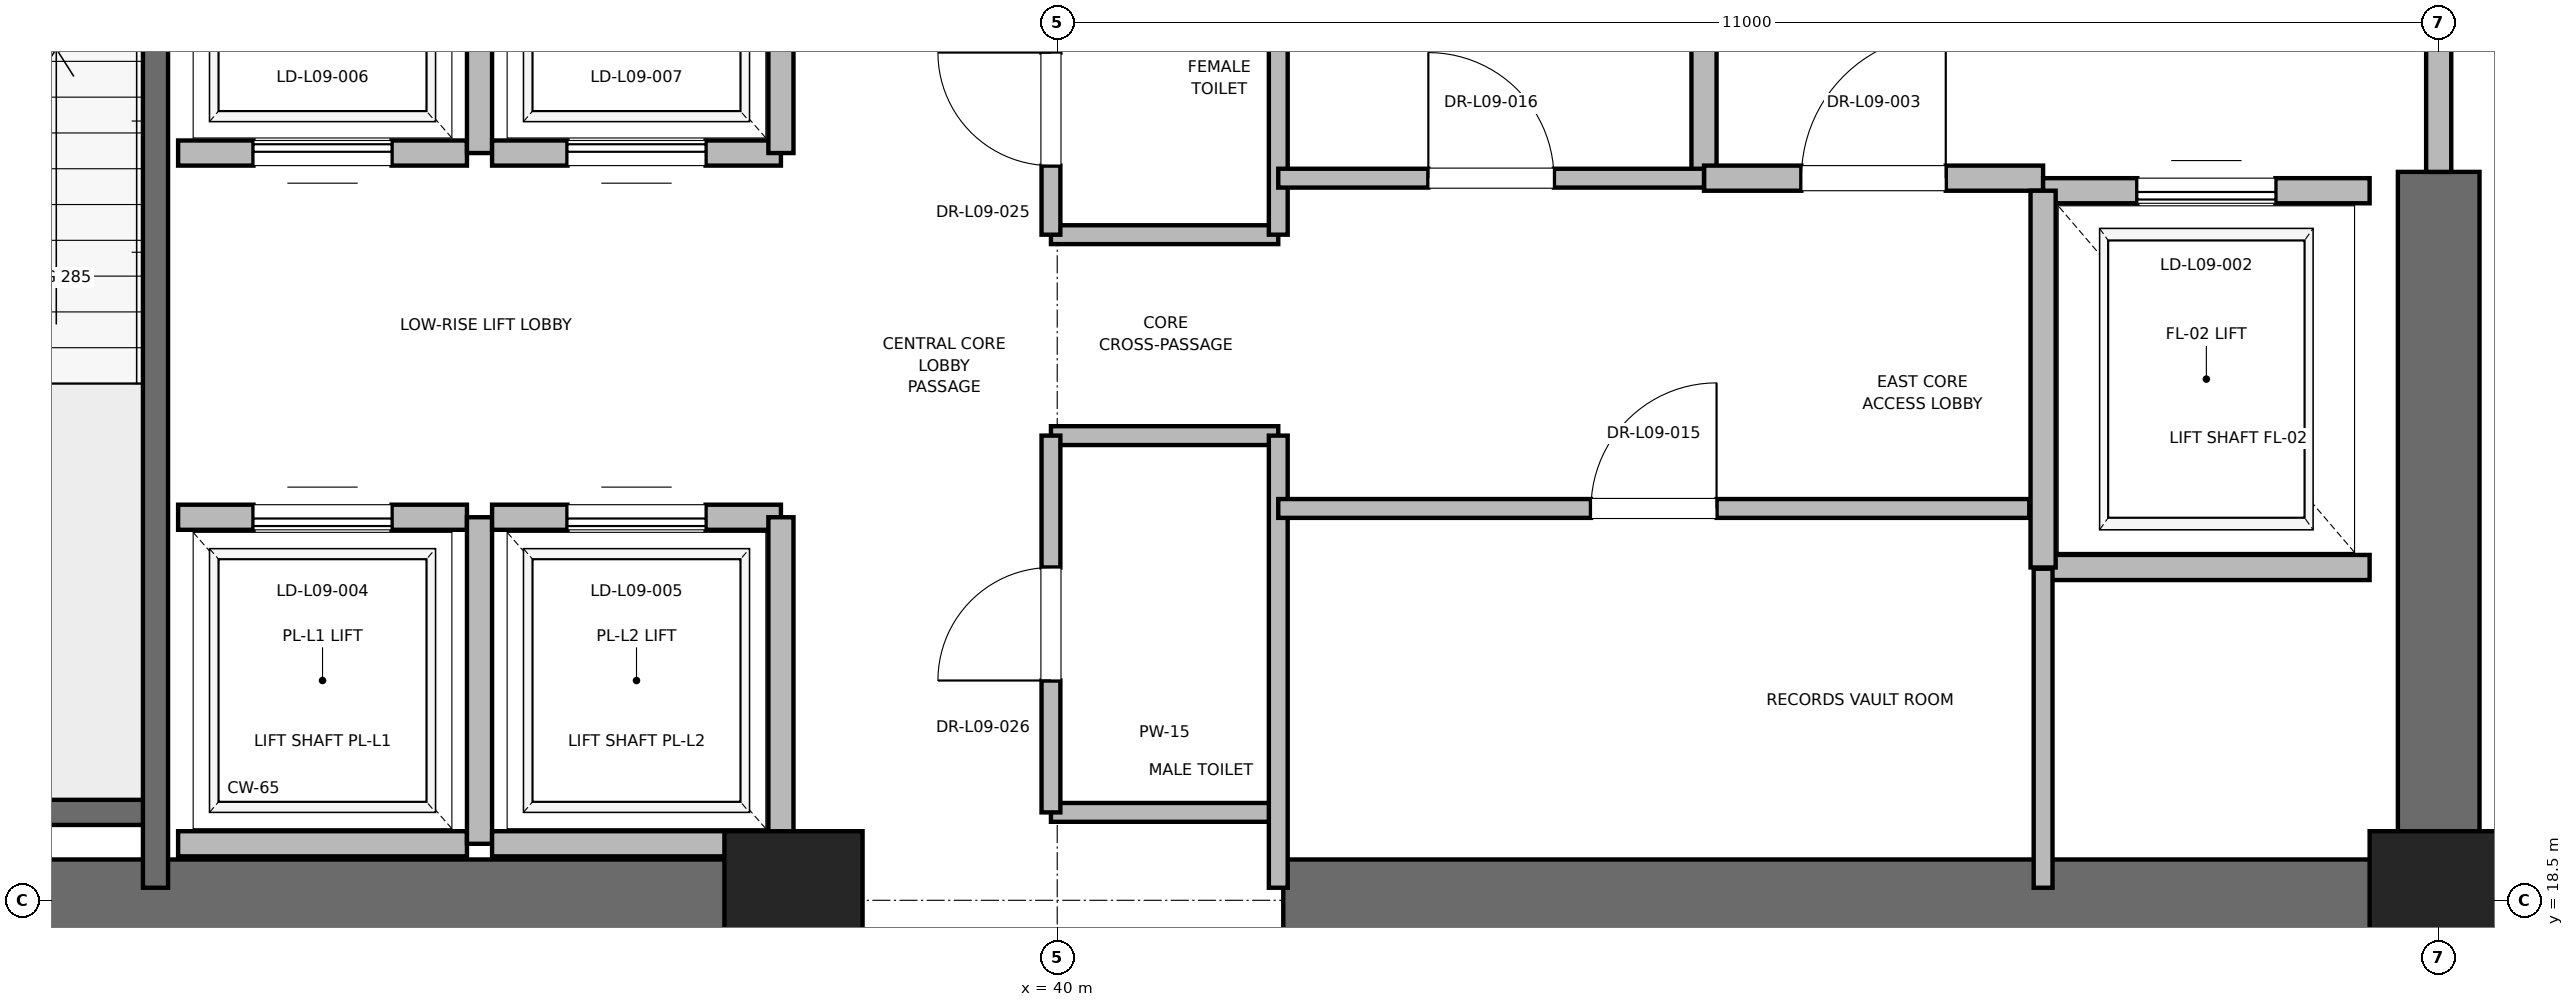
"""IFC4 building model, lengths in metres.
Left out: names, types, materials, properties, quantities, classifications, styles, units other than length and angle.
Written with IfcOpenShell. Run it as: python <this file> out.ifc"""

import sys

from ifc_helpers import new_model, si_unit, direction, frame, frame_2d, origin, origin_2d, place, context, subcontext, project, spatial, rectangle, extrude, element, fill, save


model = new_model("IFC4")
c1 = context("Model", 3, precision=1e-05, world=origin(), true_north=direction((0.0, 1.0)))
c2 = subcontext(c1, "Body", "Model", "MODEL_VIEW")
j1 = project(units=[si_unit("LENGTHUNIT", "METRE"), si_unit("PLANEANGLEUNIT", "RADIAN")], contexts=[c1])
p1 = place(None, origin())
s1 = spatial("IfcSite", under=j1, at=p1, CompositionType="ELEMENT")
p2 = place(p1, origin())
s2 = spatial("IfcBuilding", under=s1, at=p2, CompositionType="ELEMENT")
p3 = place(p2, frame((0.0, 0.0, 43.6)))
s3 = spatial("IfcBuildingStorey", under=s2, at=p3, CompositionType="ELEMENT", Elevation=43.6)
for number, where, z_axis, x_axis in (
    (1, (51.0, 18.5, 0.0), (0.0, 0.0, 1.0), (1.0, 0.0, 0.0)),
    (2, (37.9, 18.5, 0.0), (0.0, 0.0, 1.0), (1.0, 0.0, 0.0)),
):
    element("IfcColumn", number, at=place(p3, frame(where, z_axis=z_axis, x_axis=x_axis)), inside=s3, PredefinedType="PILASTER", context=c2, shape_type="SweptSolid", body=[
        extrude(rectangle(XDim=1.1, YDim=1.1, at=origin_2d()), origin(), (0.0, 0.0, 1.0), 4.0),
    ])
for number, where, z_axis, x_axis in (
    (3, (29.0, 18.5, 0.0), (0.0, 0.0, 1.0), (1.0, 0.0, 0.0)),
    (4, (41.8, 18.5, 0.0), (0.0, 0.0, 1.0), (1.0, 0.0, 0.0)),
):
    element("IfcWall", number, at=place(p3, frame(where, z_axis=z_axis, x_axis=x_axis)), inside=s3, PredefinedType="SHEAR", context=c2, shape_type="SweptSolid", body=[
        extrude(rectangle(XDim=9.2, YDim=0.65, at=frame_2d((4.6, 0.0))), origin(), (0.0, 0.0, 1.0), 3.76),
    ])
p4 = place(p3, frame((51.0, 18.5, 0.0), z_axis=(0.0, 0.0, 1.0), x_axis=(0.0, 1.0, 0.0)))
e5 = element("IfcWall", 5, at=p4, inside=s3, PredefinedType="SHEAR", context=c2, shape_type="SweptSolid", body=[
    extrude(rectangle(XDim=5.8, YDim=0.65, at=frame_2d((2.9, 0.0))), origin(), (0.0, 0.0, 1.0), 3.76),
])
p5 = place(p3, frame((29.7, 19.2, 0.0), z_axis=(0.0, 0.0, 1.0), x_axis=(1.0, 0.0, 0.0)))
e6 = element("IfcWall", 6, at=p5, inside=s3, PredefinedType="SOLIDWALL", context=c2, shape_type="SweptSolid", body=[
    extrude(rectangle(XDim=3.12, YDim=0.2, at=frame_2d((1.56, 0.0))), origin(), (0.0, 0.0, 1.0), 3.76),
])
p6 = place(p3, frame((32.82, 18.6, 0.0), z_axis=(0.0, 0.0, 1.0), x_axis=(0.0, 1.0, 0.0)))
e7 = element("IfcWall", 7, at=p6, inside=s3, PredefinedType="SOLIDWALL", context=c2, shape_type="SweptSolid", body=[
    extrude(rectangle(XDim=8.78, YDim=0.2, at=frame_2d((4.39, 0.0))), origin(), (0.0, 0.0, 1.0), 3.76),
])
p7 = place(p3, frame((45.15, 24.25, 0.0), z_axis=(0.0, 0.0, 1.0), x_axis=(0.0, 1.0, 0.0)))
e8 = element("IfcWall", 8, at=p7, inside=s3, PredefinedType="PARTITIONING", context=c2, shape_type="SweptSolid", body=[
    extrude(rectangle(XDim=3.37, YDim=0.2, at=frame_2d((1.685, 0.0))), origin(), (0.0, 0.0, 1.0), 3.76),
])
p8 = place(p3, frame((45.15, 24.25, 0.0), z_axis=(0.0, 0.0, 1.0), x_axis=(1.0, 0.0, 0.0)))
e9 = element("IfcWall", 9, at=p8, inside=s3, PredefinedType="PARTITIONING", context=c2, shape_type="SweptSolid", body=[
    extrude(rectangle(XDim=2.7, YDim=0.2, at=frame_2d((1.35, 0.0))), origin(), (0.0, 0.0, 1.0), 3.76),
])
p9 = place(p8, frame((0.775, 0.0, 0.0)))
e10 = element("IfcOpeningElement", 10, at=p9, cuts=e9, PredefinedType="OPENING", context=c2, shape_type="SweptSolid", body=[
    extrude(rectangle(XDim=1.15, YDim=2.2, at=frame_2d((0.575, 1.1))), frame((0.0, 0.1, 0.0), z_axis=(0.0, -1.0, 0.0), x_axis=(1.0, 0.0, 0.0)), (0.0, 0.0, 1.0), 0.2),
])
p10 = place(p3, frame((51.0, 24.3, 0.0), z_axis=(0.0, 0.0, 1.0), x_axis=(0.0, 1.0, 0.0)))
e11 = element("IfcWall", 11, at=p10, inside=s3, PredefinedType="PARTITIONING", context=c2, shape_type="SweptSolid", body=[
    extrude(rectangle(XDim=3.4, YDim=0.2, at=frame_2d((1.7, 0.0))), origin(), (0.0, 0.0, 1.0), 2.54),
])
p11 = place(p10, frame((1.125, 0.0, 0.0)))
e12 = element("IfcOpeningElement", 12, at=p11, cuts=e11, PredefinedType="OPENING", context=c2, shape_type="SweptSolid", body=[
    extrude(rectangle(XDim=1.15, YDim=2.2, at=frame_2d((0.575, 1.1))), frame((0.0, 0.1, 0.0), z_axis=(0.0, -1.0, 0.0), x_axis=(1.0, 0.0, 0.0)), (0.0, 0.0, 1.0), 0.2),
])
p12 = place(p3, frame((47.85, 21.15, 0.0), z_axis=(0.0, 0.0, 1.0), x_axis=(1.0, 0.0, 0.0)))
e13 = element("IfcWall", 13, at=p12, inside=s3, PredefinedType="SOLIDWALL", context=c2, shape_type="SweptSolid", body=[
    extrude(rectangle(XDim=2.6, YDim=0.2, at=frame_2d((1.3, 0.0))), origin(), (0.0, 0.0, 1.0), 3.76),
])
p13 = place(p3, frame((50.45, 24.15, 0.0), z_axis=(0.0, 0.0, 1.0), x_axis=(-1.0, 0.0, 0.0)))
e14 = element("IfcWall", 14, at=p13, inside=s3, PredefinedType="SOLIDWALL", context=c2, shape_type="SweptSolid", body=[
    extrude(rectangle(XDim=2.6, YDim=0.2, at=frame_2d((1.3, 0.0))), origin(), (0.0, 0.0, 1.0), 2.54),
])
p14 = place(p13, frame((0.75, 0.0, 0.0)))
e15 = element("IfcOpeningElement", 15, at=p14, cuts=e14, PredefinedType="OPENING", context=c2, shape_type="SweptSolid", body=[
    extrude(rectangle(XDim=1.1, YDim=2.2, at=frame_2d((0.55, 1.1))), frame((0.0, 0.1, 0.0), z_axis=(0.0, -1.0, 0.0), x_axis=(1.0, 0.0, 0.0)), (0.0, 0.0, 1.0), 0.2),
])
p15 = place(p3, frame((47.85, 24.15, 0.0), z_axis=(0.0, 0.0, 1.0), x_axis=(0.0, -1.0, 0.0)))
e16 = element("IfcWall", 16, at=p15, inside=s3, PredefinedType="SOLIDWALL", context=c2, shape_type="SweptSolid", body=[
    extrude(rectangle(XDim=3.0, YDim=0.2, at=frame_2d((1.5, 0.0))), origin(), (0.0, 0.0, 1.0), 3.76),
])
p16 = place(p3, frame((33.0, 18.95, 0.0), z_axis=(0.0, 0.0, 1.0), x_axis=(1.0, 0.0, 0.0)))
e17 = element("IfcWall", 17, at=p16, inside=s3, PredefinedType="SOLIDWALL", context=c2, shape_type="SweptSolid", body=[
    extrude(rectangle(XDim=2.3, YDim=0.2, at=frame_2d((1.15, 0.0))), origin(), (0.0, 0.0, 1.0), 3.76),
])
p17 = place(p3, frame((35.3, 21.55, 0.0), z_axis=(0.0, 0.0, 1.0), x_axis=(-1.0, 0.0, 0.0)))
e18 = element("IfcWall", 18, at=p17, inside=s3, PredefinedType="SOLIDWALL", context=c2, shape_type="SweptSolid", body=[
    extrude(rectangle(XDim=2.3, YDim=0.2, at=frame_2d((1.15, 0.0))), origin(), (0.0, 0.0, 1.0), 3.76),
])
p18 = place(p17, frame((0.6, 0.0, 0.0)))
e19 = element("IfcOpeningElement", 19, at=p18, cuts=e18, PredefinedType="OPENING", context=c2, shape_type="SweptSolid", body=[
    extrude(rectangle(XDim=1.1, YDim=2.2, at=frame_2d((0.55, 1.1))), frame((0.0, 0.1, 0.0), z_axis=(0.0, -1.0, 0.0), x_axis=(1.0, 0.0, 0.0)), (0.0, 0.0, 1.0), 0.2),
])
p19 = place(p3, frame((35.4, 18.95, 0.0), z_axis=(0.0, 0.0, 1.0), x_axis=(0.0, 1.0, 0.0)))
e20 = element("IfcWall", 20, at=p19, inside=s3, PredefinedType="SOLIDWALL", context=c2, shape_type="SweptSolid", body=[
    extrude(rectangle(XDim=2.6, YDim=0.2, at=frame_2d((1.3, 0.0))), origin(), (0.0, 0.0, 1.0), 3.76),
])
p20 = place(p3, frame((35.5, 18.95, 0.0), z_axis=(0.0, 0.0, 1.0), x_axis=(1.0, 0.0, 0.0)))
e21 = element("IfcWall", 21, at=p20, inside=s3, PredefinedType="SOLIDWALL", context=c2, shape_type="SweptSolid", body=[
    extrude(rectangle(XDim=2.3, YDim=0.2, at=frame_2d((1.15, 0.0))), origin(), (0.0, 0.0, 1.0), 2.54),
])
p21 = place(p3, frame((37.8, 21.55, 0.0), z_axis=(0.0, 0.0, 1.0), x_axis=(-1.0, 0.0, 0.0)))
e22 = element("IfcWall", 22, at=p21, inside=s3, PredefinedType="SOLIDWALL", context=c2, shape_type="SweptSolid", body=[
    extrude(rectangle(XDim=2.3, YDim=0.2, at=frame_2d((1.15, 0.0))), origin(), (0.0, 0.0, 1.0), 3.76),
])
p22 = place(p21, frame((0.6, 0.0, 0.0)))
e23 = element("IfcOpeningElement", 23, at=p22, cuts=e22, PredefinedType="OPENING", context=c2, shape_type="SweptSolid", body=[
    extrude(rectangle(XDim=1.1, YDim=2.2, at=frame_2d((0.55, 1.1))), frame((0.0, 0.1, 0.0), z_axis=(0.0, -1.0, 0.0), x_axis=(1.0, 0.0, 0.0)), (0.0, 0.0, 1.0), 0.2),
])
p23 = place(p3, frame((37.8, 18.95, 0.0), z_axis=(0.0, 0.0, 1.0), x_axis=(0.0, 1.0, 0.0)))
e24 = element("IfcWall", 24, at=p23, inside=s3, PredefinedType="SOLIDWALL", context=c2, shape_type="SweptSolid", body=[
    extrude(rectangle(XDim=2.6, YDim=0.2, at=frame_2d((1.3, 0.0))), origin(), (0.0, 0.0, 1.0), 2.54),
])
p24 = place(p3, frame((33.0, 24.45, 0.0), z_axis=(0.0, 0.0, 1.0), x_axis=(1.0, 0.0, 0.0)))
e25 = element("IfcWall", 25, at=p24, inside=s3, PredefinedType="SOLIDWALL", context=c2, shape_type="SweptSolid", body=[
    extrude(rectangle(XDim=2.3, YDim=0.2, at=frame_2d((1.15, 0.0))), origin(), (0.0, 0.0, 1.0), 3.76),
])
p25 = place(p24, frame((0.6, 0.0, 0.0)))
e26 = element("IfcOpeningElement", 26, at=p25, cuts=e25, PredefinedType="OPENING", context=c2, shape_type="SweptSolid", body=[
    extrude(rectangle(XDim=1.1, YDim=2.2, at=frame_2d((0.55, 1.1))), frame((0.0, 0.1, 0.0), z_axis=(0.0, -1.0, 0.0), x_axis=(1.0, 0.0, 0.0)), (0.0, 0.0, 1.0), 0.2),
])
p26 = place(p3, frame((35.4, 24.45, 0.0), z_axis=(0.0, 0.0, 1.0), x_axis=(0.0, 1.0, 0.0)))
e27 = element("IfcWall", 27, at=p26, inside=s3, PredefinedType="SOLIDWALL", context=c2, shape_type="SweptSolid", body=[
    extrude(rectangle(XDim=2.6, YDim=0.2, at=frame_2d((1.3, 0.0))), origin(), (0.0, 0.0, 1.0), 3.76),
])
p27 = place(p3, frame((35.5, 24.45, 0.0), z_axis=(0.0, 0.0, 1.0), x_axis=(1.0, 0.0, 0.0)))
e28 = element("IfcWall", 28, at=p27, inside=s3, PredefinedType="SOLIDWALL", context=c2, shape_type="SweptSolid", body=[
    extrude(rectangle(XDim=2.3, YDim=0.2, at=frame_2d((1.15, 0.0))), origin(), (0.0, 0.0, 1.0), 3.76),
])
p28 = place(p27, frame((0.6, 0.0, 0.0)))
e29 = element("IfcOpeningElement", 29, at=p28, cuts=e28, PredefinedType="OPENING", context=c2, shape_type="SweptSolid", body=[
    extrude(rectangle(XDim=1.1, YDim=2.2, at=frame_2d((0.55, 1.1))), frame((0.0, 0.1, 0.0), z_axis=(0.0, -1.0, 0.0), x_axis=(1.0, 0.0, 0.0)), (0.0, 0.0, 1.0), 0.2),
])
p29 = place(p3, frame((37.8, 24.45, 0.0), z_axis=(0.0, 0.0, 1.0), x_axis=(0.0, 1.0, 0.0)))
e30 = element("IfcWall", 30, at=p29, inside=s3, PredefinedType="SOLIDWALL", context=c2, shape_type="SweptSolid", body=[
    extrude(rectangle(XDim=2.6, YDim=0.2, at=frame_2d((1.3, 0.0))), origin(), (0.0, 0.0, 1.0), 3.76),
])
for number, where, z_axis, x_axis in (
    (31, (39.95, 19.2, 0.0), (0.0, 0.0, 1.0), (1.0, 0.0, 0.0)),
    (32, (39.95, 22.2, 0.0), (0.0, 0.0, 1.0), (1.0, 0.0, 0.0)),
    (33, (39.95, 23.8, 0.0), (0.0, 0.0, 1.0), (1.0, 0.0, 0.0)),
):
    element("IfcWall", number, at=place(p3, frame(where, z_axis=z_axis, x_axis=x_axis)), inside=s3, PredefinedType="PARTITIONING", context=c2, shape_type="SweptSolid", body=[
        extrude(rectangle(XDim=1.81, YDim=0.15, at=frame_2d((0.905, 0.0))), origin(), (0.0, 0.0, 1.0), 2.85),
    ])
p30 = place(p3, frame((41.76, 18.6, 0.0), z_axis=(0.0, 0.0, 1.0), x_axis=(0.0, 1.0, 0.0)))
e34 = element("IfcWall", 34, at=p30, inside=s3, PredefinedType="PARTITIONING", context=c2, shape_type="SweptSolid", body=[
    extrude(rectangle(XDim=3.6, YDim=0.15, at=frame_2d((1.8, 0.0))), origin(), (0.0, 0.0, 1.0), 2.54),
])
p31 = place(p3, frame((41.76, 23.8, 0.0), z_axis=(0.0, 0.0, 1.0), x_axis=(0.0, 1.0, 0.0)))
e35 = element("IfcWall", 35, at=p31, inside=s3, PredefinedType="PARTITIONING", context=c2, shape_type="SweptSolid", body=[
    extrude(rectangle(XDim=4.0, YDim=0.15, at=frame_2d((2.0, 0.0))), origin(), (0.0, 0.0, 1.0), 2.85),
])
p32 = place(p3, frame((39.95, 19.2, 0.0), z_axis=(0.0, 0.0, 1.0), x_axis=(0.0, 1.0, 0.0)))
e36 = element("IfcWall", 36, at=p32, inside=s3, PredefinedType="PARTITIONING", context=c2, shape_type="SweptSolid", body=[
    extrude(rectangle(XDim=3.0, YDim=0.15, at=frame_2d((1.5, 0.0))), origin(), (0.0, 0.0, 1.0), 2.85),
])
p33 = place(p32, frame((1.05, 0.0, 0.0)))
e37 = element("IfcOpeningElement", 37, at=p33, cuts=e36, PredefinedType="OPENING", context=c2, shape_type="SweptSolid", body=[
    extrude(rectangle(XDim=0.9, YDim=2.1, at=frame_2d((0.45, 1.05))), frame((0.0, 0.075, 0.0), z_axis=(0.0, -1.0, 0.0), x_axis=(1.0, 0.0, 0.0)), (0.0, 0.0, 1.0), 0.15),
])
p34 = place(p3, frame((39.95, 23.8, 0.0), z_axis=(0.0, 0.0, 1.0), x_axis=(0.0, 1.0, 0.0)))
e38 = element("IfcWall", 38, at=p34, inside=s3, PredefinedType="PARTITIONING", context=c2, shape_type="SweptSolid", body=[
    extrude(rectangle(XDim=2.0, YDim=0.15, at=frame_2d((1.0, 0.0))), origin(), (0.0, 0.0, 1.0), 2.85),
])
p35 = place(p34, frame((0.55, 0.0, 0.0)))
e39 = element("IfcOpeningElement", 39, at=p35, cuts=e38, PredefinedType="OPENING", context=c2, shape_type="SweptSolid", body=[
    extrude(rectangle(XDim=0.9, YDim=2.1, at=frame_2d((0.45, 1.05))), frame((0.0, 0.075, 0.0), z_axis=(0.0, -1.0, 0.0), x_axis=(1.0, 0.0, 0.0)), (0.0, 0.0, 1.0), 0.15),
])
p36 = place(p3, frame((47.85, 18.6, 0.0), z_axis=(0.0, 0.0, 1.0), x_axis=(0.0, 1.0, 0.0)))
e40 = element("IfcWall", 40, at=p36, inside=s3, PredefinedType="PARTITIONING", context=c2, shape_type="SweptSolid", body=[
    extrude(rectangle(XDim=2.54, YDim=0.15, at=frame_2d((1.27, 0.0))), origin(), (0.0, 0.0, 1.0), 2.85),
])
p37 = place(p3, frame((41.76, 21.62, 0.0), z_axis=(0.0, 0.0, 1.0), x_axis=(1.0, 0.0, 0.0)))
e41 = element("IfcWall", 41, at=p37, inside=s3, PredefinedType="PARTITIONING", context=c2, shape_type="SweptSolid", body=[
    extrude(rectangle(XDim=5.98, YDim=0.15, at=frame_2d((2.99, 0.0))), origin(), (0.0, 0.0, 1.0), 2.85),
])
p38 = place(p37, frame((2.49, 0.0, 0.0)))
e42 = element("IfcOpeningElement", 42, at=p38, cuts=e41, PredefinedType="OPENING", context=c2, shape_type="SweptSolid", body=[
    extrude(rectangle(XDim=1.0, YDim=2.15, at=frame_2d((0.5, 1.075))), frame((0.0, 0.075, 0.0), z_axis=(0.0, -1.0, 0.0), x_axis=(1.0, 0.0, 0.0)), (0.0, 0.0, 1.0), 0.15),
])
p39 = place(p3, frame((41.76, 24.25, 0.0), z_axis=(0.0, 0.0, 1.0), x_axis=(1.0, 0.0, 0.0)))
e43 = element("IfcWall", 43, at=p39, inside=s3, PredefinedType="PARTITIONING", context=c2, shape_type="SweptSolid", body=[
    extrude(rectangle(XDim=3.39, YDim=0.15, at=frame_2d((1.695, 0.0))), origin(), (0.0, 0.0, 1.0), 2.85),
])
p40 = place(p39, frame((1.195, 0.0, 0.0)))
e44 = element("IfcOpeningElement", 44, at=p40, cuts=e43, PredefinedType="OPENING", context=c2, shape_type="SweptSolid", body=[
    extrude(rectangle(XDim=1.0, YDim=2.15, at=frame_2d((0.5, 1.075))), frame((0.0, 0.075, 0.0), z_axis=(0.0, -1.0, 0.0), x_axis=(1.0, 0.0, 0.0)), (0.0, 0.0, 1.0), 0.15),
])
p41 = place(p9, origin())
e45 = element("IfcDoor", 45, at=p41, inside=s3, OperationType="SINGLE_SWING_RIGHT", PredefinedType="DOOR", context=c2, shape_type="SweptSolid", body=[
    extrude(rectangle(XDim=1.15, YDim=2.2, at=frame_2d((0.575, 1.1))), frame((0.0, 0.025, 0.0), z_axis=(0.0, -1.0, 0.0), x_axis=(1.0, 0.0, 0.0)), (0.0, 0.0, 1.0), 0.05),
])
fill(e10, e45)
p42 = place(p14, origin())
e46 = element("IfcDoor", 46, at=p42, inside=s3, OperationType="SLIDING_TO_RIGHT", PredefinedType="DOOR", context=c2, shape_type="SweptSolid", body=[
    extrude(rectangle(XDim=1.1, YDim=2.2, at=frame_2d((0.55, 1.1))), frame((0.0, 0.025, 0.0), z_axis=(0.0, -1.0, 0.0), x_axis=(1.0, 0.0, 0.0)), (0.0, 0.0, 1.0), 0.05),
])
fill(e15, e46)
p43 = place(p18, origin())
e47 = element("IfcDoor", 47, at=p43, inside=s3, OperationType="SLIDING_TO_RIGHT", PredefinedType="DOOR", context=c2, shape_type="SweptSolid", body=[
    extrude(rectangle(XDim=1.1, YDim=2.2, at=frame_2d((0.55, 1.1))), frame((0.0, 0.025, 0.0), z_axis=(0.0, -1.0, 0.0), x_axis=(1.0, 0.0, 0.0)), (0.0, 0.0, 1.0), 0.05),
])
fill(e19, e47)
p44 = place(p22, origin())
e48 = element("IfcDoor", 48, at=p44, inside=s3, OperationType="SLIDING_TO_RIGHT", PredefinedType="DOOR", context=c2, shape_type="SweptSolid", body=[
    extrude(rectangle(XDim=1.1, YDim=2.2, at=frame_2d((0.55, 1.1))), frame((0.0, 0.025, 0.0), z_axis=(0.0, -1.0, 0.0), x_axis=(1.0, 0.0, 0.0)), (0.0, 0.0, 1.0), 0.05),
])
fill(e23, e48)
p45 = place(p25, origin())
e49 = element("IfcDoor", 49, at=p45, inside=s3, OperationType="SLIDING_TO_RIGHT", PredefinedType="DOOR", context=c2, shape_type="SweptSolid", body=[
    extrude(rectangle(XDim=1.1, YDim=2.2, at=frame_2d((0.55, 1.1))), frame((0.0, 0.025, 0.0), z_axis=(0.0, -1.0, 0.0), x_axis=(1.0, 0.0, 0.0)), (0.0, 0.0, 1.0), 0.05),
])
fill(e26, e49)
p46 = place(p28, origin())
e50 = element("IfcDoor", 50, at=p46, inside=s3, OperationType="SLIDING_TO_RIGHT", PredefinedType="DOOR", context=c2, shape_type="SweptSolid", body=[
    extrude(rectangle(XDim=1.1, YDim=2.2, at=frame_2d((0.55, 1.1))), frame((0.0, 0.025, 0.0), z_axis=(0.0, -1.0, 0.0), x_axis=(1.0, 0.0, 0.0)), (0.0, 0.0, 1.0), 0.05),
])
fill(e29, e50)
p47 = place(p33, origin())
e51 = element("IfcDoor", 51, at=p47, inside=s3, OperationType="SINGLE_SWING_LEFT", PredefinedType="DOOR", context=c2, shape_type="SweptSolid", body=[
    extrude(rectangle(XDim=0.9, YDim=2.1, at=frame_2d((0.45, 1.05))), frame((0.0, 0.025, 0.0), z_axis=(0.0, -1.0, 0.0), x_axis=(1.0, 0.0, 0.0)), (0.0, 0.0, 1.0), 0.05),
])
fill(e37, e51)
p48 = place(p35, origin())
e52 = element("IfcDoor", 52, at=p48, inside=s3, OperationType="SINGLE_SWING_RIGHT", PredefinedType="DOOR", context=c2, shape_type="SweptSolid", body=[
    extrude(rectangle(XDim=0.9, YDim=2.1, at=frame_2d((0.45, 1.05))), frame((0.0, 0.025, 0.0), z_axis=(0.0, -1.0, 0.0), x_axis=(1.0, 0.0, 0.0)), (0.0, 0.0, 1.0), 0.05),
])
fill(e39, e52)
p49 = place(p38, origin())
e53 = element("IfcDoor", 53, at=p49, inside=s3, OperationType="SINGLE_SWING_RIGHT", PredefinedType="DOOR", context=c2, shape_type="SweptSolid", body=[
    extrude(rectangle(XDim=1.0, YDim=2.15, at=frame_2d((0.5, 1.075))), frame((0.0, 0.025, 0.0), z_axis=(0.0, -1.0, 0.0), x_axis=(1.0, 0.0, 0.0)), (0.0, 0.0, 1.0), 0.05),
])
fill(e42, e53)
p50 = place(p40, origin())
e54 = element("IfcDoor", 54, at=p50, inside=s3, OperationType="SINGLE_SWING_LEFT", PredefinedType="DOOR", context=c2, shape_type="SweptSolid", body=[
    extrude(rectangle(XDim=1.0, YDim=2.15, at=frame_2d((0.5, 1.075))), frame((0.0, 0.025, 0.0), z_axis=(0.0, -1.0, 0.0), x_axis=(1.0, 0.0, 0.0)), (0.0, 0.0, 1.0), 0.05),
])
fill(e44, e54)
save(model, sys.argv[1])
